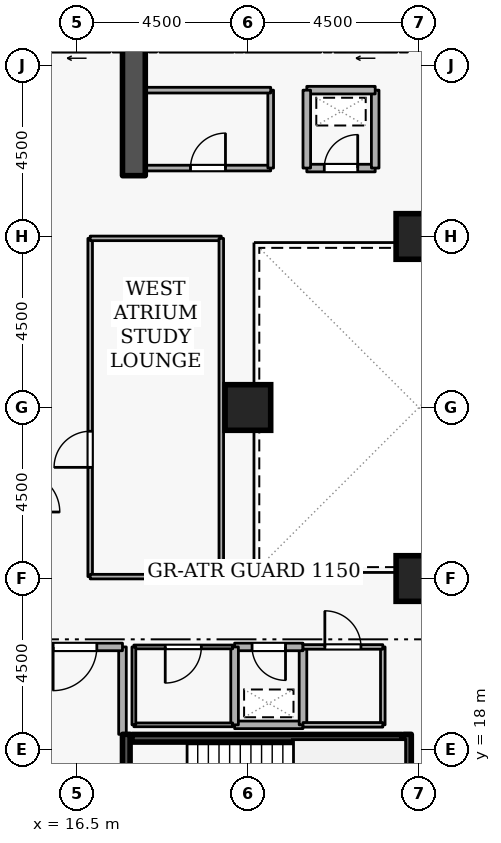
"""IFC4 building model, lengths in metres.
Left out: names, types, materials, properties, quantities, classifications, styles, units other than length and angle.
Written with IfcOpenShell. Run it as: python <this file> out.ifc"""

import sys

from ifc_helpers import new_model, si_unit, direction, frame, frame_2d, origin, origin_2d, place, context, subcontext, project, spatial, rectangle, extrude, element, fill, save


model = new_model("IFC4")
c1 = context("Model", 3, precision=1e-05, world=origin(), true_north=direction((0.0, 1.0)))
c2 = subcontext(c1, "Body", "Model", "MODEL_VIEW")
j1 = project(units=[si_unit("LENGTHUNIT", "METRE"), si_unit("PLANEANGLEUNIT", "RADIAN")], contexts=[c1])
p1 = place(None, origin())
s1 = spatial("IfcSite", under=j1, at=p1, CompositionType="ELEMENT")
p2 = place(p1, origin())
s2 = spatial("IfcBuilding", under=s1, at=p2, CompositionType="ELEMENT")
p3 = place(p2, frame((0.0, 0.0, 116.1)))
s3 = spatial("IfcBuildingStorey", under=s2, at=p3, CompositionType="ELEMENT", Elevation=116.1)
p4 = place(p3, frame((18.0, 33.1, 0.0), z_axis=(0.0, 0.0, 1.0), x_axis=(0.0, 1.0, 0.0)))
e1 = element("IfcWall", 1, at=p4, inside=s3, PredefinedType="SHEAR", context=c2, shape_type="SweptSolid", body=[
    extrude(rectangle(XDim=5.7, YDim=0.6, at=frame_2d((2.85, 0.0))), origin(), (0.0, 0.0, 1.0), 3.6),
])
for number, where, z_axis, x_axis in (
    (2, (25.5, 22.5, 0.0), (0.0, 0.0, 1.0), (1.0, 0.0, 0.0)),
    (3, (25.5, 31.5, 0.0), (0.0, 0.0, 1.0), (1.0, 0.0, 0.0)),
    (4, (21.0, 27.0, 0.0), (0.0, 0.0, 1.0), (1.0, 0.0, 0.0)),
):
    element("IfcColumn", number, at=place(p3, frame(where, z_axis=z_axis, x_axis=x_axis)), inside=s3, PredefinedType="COLUMN", context=c2, shape_type="SweptSolid", body=[
        extrude(rectangle(XDim=1.2, YDim=1.2, at=origin_2d()), origin(), (0.0, 0.0, 1.0), 3.6),
    ])
p5 = place(p3, frame((24.92, 36.45, 0.0), z_axis=(0.0, 0.0, 1.0), x_axis=(-1.0, 0.0, 0.0)))
e5 = element("IfcWall", 5, at=p5, inside=s3, PredefinedType="STANDARD", context=c2, shape_type="SweptSolid", body=[
    extrude(rectangle(XDim=1.64, YDim=0.2, at=frame_2d((0.82, 0.0))), origin(), (0.0, 0.0, 1.0), 3.32),
])
p6 = place(p5, frame((0.31, 0.0, 0.0)))
e6 = element("IfcOpeningElement", 6, at=p6, cuts=e5, PredefinedType="OPENING", context=c2, shape_type="SweptSolid", body=[
    extrude(rectangle(XDim=1.02, YDim=2.06, at=frame_2d((0.51, 1.03))), frame((0.0, 0.11, 0.0), z_axis=(0.0, -1.0, 0.0), x_axis=(1.0, 0.0, 0.0)), (0.0, 0.0, 1.0), 0.22),
])
p7 = place(p3, frame((22.92, 36.45, 0.0), z_axis=(0.0, 0.0, 1.0), x_axis=(-1.0, 0.0, 0.0)))
e7 = element("IfcWall", 7, at=p7, inside=s3, PredefinedType="STANDARD", context=c2, shape_type="SweptSolid", body=[
    extrude(rectangle(XDim=1.99, YDim=0.2, at=frame_2d((0.995, 0.0))), origin(), (0.0, 0.0, 1.0), 3.32),
])
p8 = place(p3, frame((20.62, 36.45, 0.0), z_axis=(0.0, 0.0, 1.0), x_axis=(-1.0, 0.0, 0.0)))
e8 = element("IfcWall", 8, at=p8, inside=s3, PredefinedType="STANDARD", context=c2, shape_type="SweptSolid", body=[
    extrude(rectangle(XDim=1.94, YDim=0.2, at=frame_2d((0.97, 0.0))), origin(), (0.0, 0.0, 1.0), 3.32),
])
p9 = place(p3, frame((17.37, 36.45, 0.0), z_axis=(0.0, 0.0, 1.0), x_axis=(-1.0, 0.0, 0.0)))
e9 = element("IfcWall", 9, at=p9, inside=s3, PredefinedType="STANDARD", context=c2, shape_type="SweptSolid", body=[
    extrude(rectangle(XDim=1.74, YDim=0.2, at=frame_2d((0.87, 0.0))), origin(), (0.0, 0.0, 1.0), 3.32),
])
p10 = place(p9, frame((0.36, 0.0, 0.0)))
e10 = element("IfcOpeningElement", 10, at=p10, cuts=e9, PredefinedType="OPENING", context=c2, shape_type="SweptSolid", body=[
    extrude(rectangle(XDim=1.02, YDim=2.06, at=frame_2d((0.51, 1.03))), frame((0.0, 0.11, 0.0), z_axis=(0.0, -1.0, 0.0), x_axis=(1.0, 0.0, 0.0)), (0.0, 0.0, 1.0), 0.22),
])
p11 = place(p3, frame((17.8, 15.05, 0.0), z_axis=(0.0, 0.0, 1.0), x_axis=(0.0, 1.0, 0.0)))
e11 = element("IfcWall", 11, at=p11, inside=s3, PredefinedType="SHEAR", context=c2, shape_type="SweptSolid", body=[
    extrude(rectangle(XDim=3.35, YDim=0.2, at=frame_2d((1.675, 0.0))), origin(), (0.0, 0.0, 1.0), 3.6),
])
p12 = place(p11, frame((1.125, 0.0, 0.0)))
e12 = element("IfcOpeningElement", 12, at=p12, cuts=e11, PredefinedType="OPENING", context=c2, shape_type="SweptSolid", body=[
    extrude(rectangle(XDim=1.1, YDim=2.1, at=frame_2d((0.55, 1.05))), frame((0.0, 0.11, 0.0), z_axis=(0.0, -1.0, 0.0), x_axis=(1.0, 0.0, 0.0)), (0.0, 0.0, 1.0), 0.22),
])
p13 = place(p3, frame((25.2, 18.4, 0.0), z_axis=(0.0, 0.0, 1.0), x_axis=(0.0, -1.0, 0.0)))
e13 = element("IfcWall", 13, at=p13, inside=s3, PredefinedType="SHEAR", context=c2, shape_type="SweptSolid", body=[
    extrude(rectangle(XDim=3.35, YDim=0.2, at=frame_2d((1.675, 0.0))), origin(), (0.0, 0.0, 1.0), 3.6),
])
p14 = place(p3, frame((25.05, 18.297, 0.0), z_axis=(0.0, 0.0, 1.0), x_axis=(-1.0, 0.0, 0.0)))
e14 = element("IfcWall", 14, at=p14, inside=s3, PredefinedType="SHEAR", context=c2, shape_type="SweptSolid", body=[
    extrude(rectangle(XDim=7.1, YDim=0.2, at=frame_2d((3.55, 0.0))), origin(), (0.0, 0.0, 1.0), 3.6),
])
p15 = place(p3, frame((17.7, 18.4, 0.0), z_axis=(0.0, 0.0, 1.0), x_axis=(0.0, 1.0, 0.0)))
e15 = element("IfcWall", 15, at=p15, inside=s3, PredefinedType="STANDARD", context=c2, shape_type="SweptSolid", body=[
    extrude(rectangle(XDim=2.3, YDim=0.2, at=frame_2d((1.15, 0.0))), origin(), (0.0, 0.0, 1.0), 2.525),
])
p16 = place(p3, frame((17.7, 20.7, 0.0), z_axis=(0.0, 0.0, 1.0), x_axis=(-1.0, 0.0, 0.0)))
e16 = element("IfcWall", 16, at=p16, inside=s3, PredefinedType="STANDARD", context=c2, shape_type="SweptSolid", body=[
    extrude(rectangle(XDim=2.5, YDim=0.2, at=frame_2d((1.25, 0.0))), origin(), (0.0, 0.0, 1.0), 3.32),
])
p17 = place(p16, frame((0.675, 0.0, 0.0)))
e17 = element("IfcOpeningElement", 17, at=p17, cuts=e16, PredefinedType="OPENING", context=c2, shape_type="SweptSolid", body=[
    extrude(rectangle(XDim=1.15, YDim=2.1, at=frame_2d((0.575, 1.05))), frame((0.0, 0.11, 0.0), z_axis=(0.0, -1.0, 0.0), x_axis=(1.0, 0.0, 0.0)), (0.0, 0.0, 1.0), 0.22),
])
p18 = place(p3, frame((20.65, 18.65, 0.0), z_axis=(0.0, 0.0, 1.0), x_axis=(1.0, 0.0, 0.0)))
e18 = element("IfcWall", 18, at=p18, inside=s3, PredefinedType="STANDARD", context=c2, shape_type="SweptSolid", body=[
    extrude(rectangle(XDim=1.8, YDim=0.2, at=frame_2d((0.9, 0.0))), origin(), (0.0, 0.0, 1.0), 3.32),
])
p19 = place(p3, frame((22.45, 18.65, 0.0), z_axis=(0.0, 0.0, 1.0), x_axis=(0.0, 1.0, 0.0)))
e19 = element("IfcWall", 19, at=p19, inside=s3, PredefinedType="STANDARD", context=c2, shape_type="SweptSolid", body=[
    extrude(rectangle(XDim=2.05, YDim=0.2, at=frame_2d((1.025, 0.0))), origin(), (0.0, 0.0, 1.0), 3.32),
])
p20 = place(p3, frame((22.45, 20.7, 0.0), z_axis=(0.0, 0.0, 1.0), x_axis=(-1.0, 0.0, 0.0)))
e20 = element("IfcWall", 20, at=p20, inside=s3, PredefinedType="STANDARD", context=c2, shape_type="SweptSolid", body=[
    extrude(rectangle(XDim=1.8, YDim=0.2, at=frame_2d((0.9, 0.0))), origin(), (0.0, 0.0, 1.0), 3.32),
])
p21 = place(p20, frame((0.46, 0.0, 0.0)))
e21 = element("IfcOpeningElement", 21, at=p21, cuts=e20, PredefinedType="OPENING", context=c2, shape_type="SweptSolid", body=[
    extrude(rectangle(XDim=0.88, YDim=2.04, at=frame_2d((0.44, 1.02))), frame((0.0, 0.11, 0.0), z_axis=(0.0, -1.0, 0.0), x_axis=(1.0, 0.0, 0.0)), (0.0, 0.0, 1.0), 0.22),
])
p22 = place(p3, frame((20.65, 20.7, 0.0), z_axis=(0.0, 0.0, 1.0), x_axis=(0.0, -1.0, 0.0)))
e22 = element("IfcWall", 22, at=p22, inside=s3, PredefinedType="STANDARD", context=c2, shape_type="SweptSolid", body=[
    extrude(rectangle(XDim=2.05, YDim=0.2, at=frame_2d((1.025, 0.0))), origin(), (0.0, 0.0, 1.0), 3.32),
])
p23 = place(p3, frame((22.55, 33.3, 0.0), z_axis=(0.0, 0.0, 1.0), x_axis=(1.0, 0.0, 0.0)))
e23 = element("IfcWall", 23, at=p23, inside=s3, PredefinedType="STANDARD", context=c2, shape_type="SweptSolid", body=[
    extrude(rectangle(XDim=1.8, YDim=0.2, at=frame_2d((0.9, 0.0))), origin(), (0.0, 0.0, 1.0), 3.32),
])
p24 = place(p23, frame((0.46, 0.0, 0.0)))
e24 = element("IfcOpeningElement", 24, at=p24, cuts=e23, PredefinedType="OPENING", context=c2, shape_type="SweptSolid", body=[
    extrude(rectangle(XDim=0.88, YDim=2.04, at=frame_2d((0.44, 1.02))), frame((0.0, 0.11, 0.0), z_axis=(0.0, -1.0, 0.0), x_axis=(1.0, 0.0, 0.0)), (0.0, 0.0, 1.0), 0.22),
])
p25 = place(p3, frame((24.35, 33.3, 0.0), z_axis=(0.0, 0.0, 1.0), x_axis=(0.0, 1.0, 0.0)))
e25 = element("IfcWall", 25, at=p25, inside=s3, PredefinedType="STANDARD", context=c2, shape_type="SweptSolid", body=[
    extrude(rectangle(XDim=2.05, YDim=0.2, at=frame_2d((1.025, 0.0))), origin(), (0.0, 0.0, 1.0), 3.32),
])
p26 = place(p3, frame((24.35, 35.35, 0.0), z_axis=(0.0, 0.0, 1.0), x_axis=(-1.0, 0.0, 0.0)))
e26 = element("IfcWall", 26, at=p26, inside=s3, PredefinedType="STANDARD", context=c2, shape_type="SweptSolid", body=[
    extrude(rectangle(XDim=1.8, YDim=0.2, at=frame_2d((0.9, 0.0))), origin(), (0.0, 0.0, 1.0), 3.32),
])
p27 = place(p3, frame((22.55, 35.35, 0.0), z_axis=(0.0, 0.0, 1.0), x_axis=(0.0, -1.0, 0.0)))
e27 = element("IfcWall", 27, at=p27, inside=s3, PredefinedType="STANDARD", context=c2, shape_type="SweptSolid", body=[
    extrude(rectangle(XDim=2.05, YDim=0.2, at=frame_2d((1.025, 0.0))), origin(), (0.0, 0.0, 1.0), 3.32),
])
p28 = place(p3, frame((18.0, 18.65, 0.0), z_axis=(0.0, 0.0, 1.0), x_axis=(1.0, 0.0, 0.0)))
e28 = element("IfcWall", 28, at=p28, inside=s3, PredefinedType="PARTITIONING", context=c2, shape_type="SweptSolid", body=[
    extrude(rectangle(XDim=2.6, YDim=0.1, at=frame_2d((1.3, 0.0))), origin(), (0.0, 0.0, 1.0), 3.32),
])
p29 = place(p3, frame((20.6, 20.7, 0.0), z_axis=(0.0, 0.0, 1.0), x_axis=(-1.0, 0.0, 0.0)))
e29 = element("IfcWall", 29, at=p29, inside=s3, PredefinedType="PARTITIONING", context=c2, shape_type="SweptSolid", body=[
    extrude(rectangle(XDim=2.6, YDim=0.1, at=frame_2d((1.3, 0.0))), origin(), (0.0, 0.0, 1.0), 3.32),
])
p30 = place(p29, frame((0.825, 0.0, 0.0)))
e30 = element("IfcOpeningElement", 30, at=p30, cuts=e29, PredefinedType="OPENING", context=c2, shape_type="SweptSolid", body=[
    extrude(rectangle(XDim=0.95, YDim=2.1, at=frame_2d((0.475, 1.05))), frame((0.0, 0.06, 0.0), z_axis=(0.0, -1.0, 0.0), x_axis=(1.0, 0.0, 0.0)), (0.0, 0.0, 1.0), 0.12),
])
p31 = place(p3, frame((18.0, 20.7, 0.0), z_axis=(0.0, 0.0, 1.0), x_axis=(0.0, -1.0, 0.0)))
e31 = element("IfcWall", 31, at=p31, inside=s3, PredefinedType="PARTITIONING", context=c2, shape_type="SweptSolid", body=[
    extrude(rectangle(XDim=2.05, YDim=0.1, at=frame_2d((1.025, 0.0))), origin(), (0.0, 0.0, 1.0), 2.525),
])
p32 = place(p3, frame((24.55, 20.7, 0.0), z_axis=(0.0, 0.0, 1.0), x_axis=(0.0, -1.0, 0.0)))
e32 = element("IfcWall", 32, at=p32, inside=s3, PredefinedType="PARTITIONING", context=c2, shape_type="SweptSolid", body=[
    extrude(rectangle(XDim=2.05, YDim=0.12, at=frame_2d((1.025, 0.0))), origin(), (0.0, 0.0, 1.0), 3.32),
])
p33 = place(p3, frame((24.55, 18.65, 0.0), z_axis=(0.0, 0.0, 1.0), x_axis=(-1.0, 0.0, 0.0)))
e33 = element("IfcWall", 33, at=p33, inside=s3, PredefinedType="PARTITIONING", context=c2, shape_type="SweptSolid", body=[
    extrude(rectangle(XDim=2.1, YDim=0.12, at=frame_2d((1.05, 0.0))), origin(), (0.0, 0.0, 1.0), 3.32),
])
p34 = place(p3, frame((22.45, 20.7, 0.0), z_axis=(0.0, 0.0, 1.0), x_axis=(1.0, 0.0, 0.0)))
e34 = element("IfcWall", 34, at=p34, inside=s3, PredefinedType="PARTITIONING", context=c2, shape_type="SweptSolid", body=[
    extrude(rectangle(XDim=2.1, YDim=0.12, at=frame_2d((1.05, 0.0))), origin(), (0.0, 0.0, 1.0), 3.32),
])
p35 = place(p34, frame((0.575, 0.0, 0.0)))
e35 = element("IfcOpeningElement", 35, at=p35, cuts=e34, PredefinedType="OPENING", context=c2, shape_type="SweptSolid", body=[
    extrude(rectangle(XDim=0.95, YDim=2.1, at=frame_2d((0.475, 1.05))), frame((0.0, 0.07, 0.0), z_axis=(0.0, -1.0, 0.0), x_axis=(1.0, 0.0, 0.0)), (0.0, 0.0, 1.0), 0.14),
])
p36 = place(p3, frame((18.3, 33.3, 0.0), z_axis=(0.0, 0.0, 1.0), x_axis=(1.0, 0.0, 0.0)))
e36 = element("IfcWall", 36, at=p36, inside=s3, PredefinedType="PARTITIONING", context=c2, shape_type="SweptSolid", body=[
    extrude(rectangle(XDim=3.3, YDim=0.15, at=frame_2d((1.65, 0.0))), origin(), (0.0, 0.0, 1.0), 3.32),
])
p37 = place(p36, frame((1.19, 0.0, 0.0)))
e37 = element("IfcOpeningElement", 37, at=p37, cuts=e36, PredefinedType="OPENING", context=c2, shape_type="SweptSolid", body=[
    extrude(rectangle(XDim=0.92, YDim=2.08, at=frame_2d((0.46, 1.04))), frame((0.0, 0.085, 0.0), z_axis=(0.0, -1.0, 0.0), x_axis=(1.0, 0.0, 0.0)), (0.0, 0.0, 1.0), 0.17),
])
p38 = place(p3, frame((21.6, 33.3, 0.0), z_axis=(0.0, 0.0, 1.0), x_axis=(0.0, 1.0, 0.0)))
e38 = element("IfcWall", 38, at=p38, inside=s3, PredefinedType="PARTITIONING", context=c2, shape_type="SweptSolid", body=[
    extrude(rectangle(XDim=2.05, YDim=0.15, at=frame_2d((1.025, 0.0))), origin(), (0.0, 0.0, 1.0), 3.32),
])
p39 = place(p3, frame((21.6, 35.35, 0.0), z_axis=(0.0, 0.0, 1.0), x_axis=(-1.0, 0.0, 0.0)))
e39 = element("IfcWall", 39, at=p39, inside=s3, PredefinedType="PARTITIONING", context=c2, shape_type="SweptSolid", body=[
    extrude(rectangle(XDim=3.3, YDim=0.15, at=frame_2d((1.65, 0.0))), origin(), (0.0, 0.0, 1.0), 3.32),
])
p40 = place(p3, frame((16.85, 22.55, 0.0), z_axis=(0.0, 0.0, 1.0), x_axis=(0.0, 1.0, 0.0)))
e40 = element("IfcWall", 40, at=p40, inside=s3, PredefinedType="PARTITIONING", context=c2, shape_type="SweptSolid", body=[
    extrude(rectangle(XDim=8.9, YDim=0.12, at=frame_2d((4.45, 0.0))), origin(), (0.0, 0.0, 1.0), 3.32),
])
p41 = place(p40, frame((2.875, 0.0, 0.0)))
e41 = element("IfcOpeningElement", 41, at=p41, cuts=e40, PredefinedType="OPENING", context=c2, shape_type="SweptSolid", body=[
    extrude(rectangle(XDim=0.95, YDim=2.1, at=frame_2d((0.475, 1.05))), frame((0.0, 0.07, 0.0), z_axis=(0.0, -1.0, 0.0), x_axis=(1.0, 0.0, 0.0)), (0.0, 0.0, 1.0), 0.14),
])
p42 = place(p3, frame((16.85, 31.45, 0.0), z_axis=(0.0, 0.0, 1.0), x_axis=(1.0, 0.0, 0.0)))
e42 = element("IfcWall", 42, at=p42, inside=s3, PredefinedType="PARTITIONING", context=c2, shape_type="SweptSolid", body=[
    extrude(rectangle(XDim=3.45, YDim=0.12, at=frame_2d((1.725, 0.0))), origin(), (0.0, 0.0, 1.0), 3.32),
])
p43 = place(p3, frame((20.3, 31.45, 0.0), z_axis=(0.0, 0.0, 1.0), x_axis=(0.0, -1.0, 0.0)))
e43 = element("IfcWall", 43, at=p43, inside=s3, PredefinedType="PARTITIONING", context=c2, shape_type="SweptSolid", body=[
    extrude(rectangle(XDim=8.9, YDim=0.12, at=frame_2d((4.45, 0.0))), origin(), (0.0, 0.0, 1.0), 3.32),
])
p44 = place(p3, frame((20.3, 22.55, 0.0), z_axis=(0.0, 0.0, 1.0), x_axis=(-1.0, 0.0, 0.0)))
e44 = element("IfcWall", 44, at=p44, inside=s3, PredefinedType="PARTITIONING", context=c2, shape_type="SweptSolid", body=[
    extrude(rectangle(XDim=3.45, YDim=0.12, at=frame_2d((1.725, 0.0))), origin(), (0.0, 0.0, 1.0), 3.32),
])
p45 = place(p17, origin())
e45 = element("IfcDoor", 45, at=p45, inside=s3, OperationType="SINGLE_SWING_RIGHT", PredefinedType="DOOR", context=c2, shape_type="SweptSolid", body=[
    extrude(rectangle(XDim=1.15, YDim=2.1, at=frame_2d((0.575, 1.05))), frame((0.0, 0.025, 0.0), z_axis=(0.0, -1.0, 0.0), x_axis=(1.0, 0.0, 0.0)), (0.0, 0.0, 1.0), 0.05),
])
fill(e17, e45)
p46 = place(p21, origin())
e46 = element("IfcDoor", 46, at=p46, inside=s3, OperationType="SINGLE_SWING_LEFT", PredefinedType="DOOR", context=c2, shape_type="SweptSolid", body=[
    extrude(rectangle(XDim=0.88, YDim=2.04, at=frame_2d((0.44, 1.02))), frame((0.0, 0.025, 0.0), z_axis=(0.0, -1.0, 0.0), x_axis=(1.0, 0.0, 0.0)), (0.0, 0.0, 1.0), 0.05),
])
fill(e21, e46)
p47 = place(p24, origin())
e47 = element("IfcDoor", 47, at=p47, inside=s3, OperationType="SINGLE_SWING_RIGHT", PredefinedType="DOOR", context=c2, shape_type="SweptSolid", body=[
    extrude(rectangle(XDim=0.88, YDim=2.04, at=frame_2d((0.44, 1.02))), frame((0.0, 0.025, 0.0), z_axis=(0.0, -1.0, 0.0), x_axis=(1.0, 0.0, 0.0)), (0.0, 0.0, 1.0), 0.05),
])
fill(e24, e47)
p48 = place(p30, origin())
e48 = element("IfcDoor", 48, at=p48, inside=s3, OperationType="SINGLE_SWING_RIGHT", PredefinedType="DOOR", context=c2, shape_type="SweptSolid", body=[
    extrude(rectangle(XDim=0.95, YDim=2.1, at=frame_2d((0.475, 1.05))), frame((0.0, 0.025, 0.0), z_axis=(0.0, -1.0, 0.0), x_axis=(1.0, 0.0, 0.0)), (0.0, 0.0, 1.0), 0.05),
])
fill(e30, e48)
p49 = place(p35, origin())
e49 = element("IfcDoor", 49, at=p49, inside=s3, OperationType="SINGLE_SWING_LEFT", PredefinedType="DOOR", context=c2, shape_type="SweptSolid", body=[
    extrude(rectangle(XDim=0.95, YDim=2.1, at=frame_2d((0.475, 1.05))), frame((0.0, 0.025, 0.0), z_axis=(0.0, -1.0, 0.0), x_axis=(1.0, 0.0, 0.0)), (0.0, 0.0, 1.0), 0.05),
])
fill(e35, e49)
p50 = place(p37, origin())
e50 = element("IfcDoor", 50, at=p50, inside=s3, OperationType="SINGLE_SWING_RIGHT", PredefinedType="DOOR", context=c2, shape_type="SweptSolid", body=[
    extrude(rectangle(XDim=0.92, YDim=2.08, at=frame_2d((0.46, 1.04))), frame((0.0, 0.025, 0.0), z_axis=(0.0, -1.0, 0.0), x_axis=(1.0, 0.0, 0.0)), (0.0, 0.0, 1.0), 0.05),
])
fill(e37, e50)
p51 = place(p41, origin())
e51 = element("IfcDoor", 51, at=p51, inside=s3, OperationType="SINGLE_SWING_LEFT", PredefinedType="DOOR", context=c2, shape_type="SweptSolid", body=[
    extrude(rectangle(XDim=0.95, YDim=2.1, at=frame_2d((0.475, 1.05))), frame((0.0, 0.025, 0.0), z_axis=(0.0, -1.0, 0.0), x_axis=(1.0, 0.0, 0.0)), (0.0, 0.0, 1.0), 0.05),
])
fill(e41, e51)
save(model, sys.argv[1])
